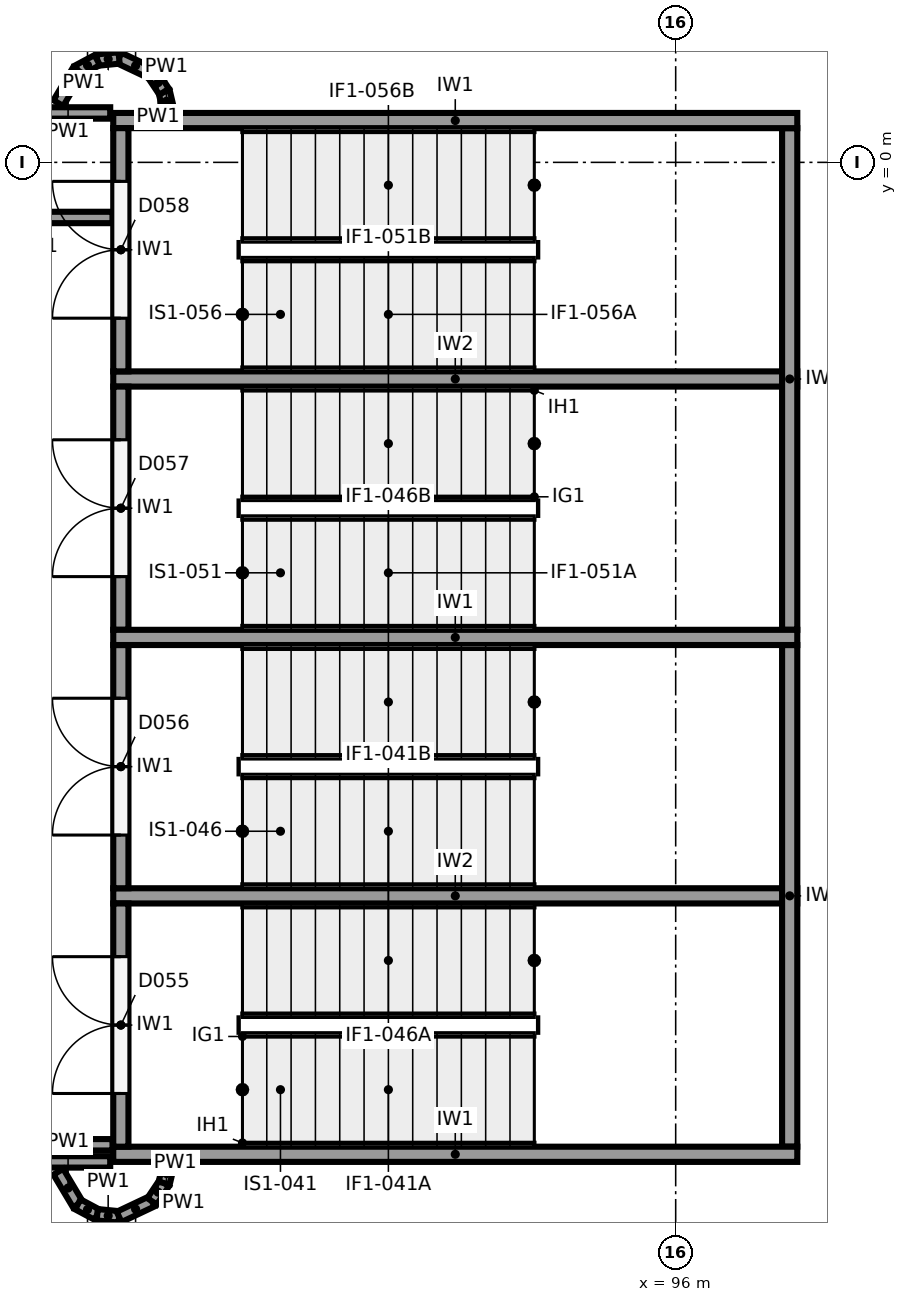
"""IFC4 building model, lengths in metres.
Left out: names, types, materials, properties, quantities, classifications, styles, units other than length and angle.
Written with IfcOpenShell. Run it as: python <this file> out.ifc"""

import sys

from ifc_helpers import new_model, si_unit, direction, frame, frame_2d, origin, place, context, subcontext, project, spatial, rectangle, extrude, element, fill, save


model = new_model("IFC4")
c1 = context("Model", 3, precision=1e-05, world=origin(), true_north=direction((0.0, 1.0)))
c2 = subcontext(c1, "Body", "Model", "MODEL_VIEW")
j1 = project(units=[si_unit("LENGTHUNIT", "METRE"), si_unit("PLANEANGLEUNIT", "RADIAN")], contexts=[c1])
p1 = place(None, origin())
s1 = spatial("IfcSite", under=j1, at=p1, CompositionType="ELEMENT")
p2 = place(p1, origin())
s2 = spatial("IfcBuilding", under=s1, at=p2, CompositionType="ELEMENT")
p3 = place(p2, frame((0.0, 0.0, -4.0)))
s3 = spatial("IfcBuildingStorey", under=s2, at=p3, CompositionType="ELEMENT", Elevation=-4.0)
for number, where, z_axis, x_axis in (
    (1, (97.6, -13.05, -1.2), (0.0, 0.0, 1.0), (-1.0, 0.0, 0.0)),
    (2, (97.6, -6.25, -1.2), (0.0, 0.0, 1.0), (-1.0, 0.0, 0.0)),
    (3, (97.6, 0.55, -1.2), (0.0, 0.0, 1.0), (-1.0, 0.0, 0.0)),
):
    element("IfcWall", number, at=place(p3, frame(where, z_axis=z_axis, x_axis=x_axis)), inside=s3, PredefinedType="SHEAR", context=c2, shape_type="SweptSolid", body=[
        extrude(rectangle(XDim=9.0, YDim=0.2, at=frame_2d((4.5, 0.0))), origin(), (0.0, 0.0, 1.0), 4.8),
    ])
for number, where, z_axis, x_axis in (
    (4, (97.5, -12.95, -1.2), (0.0, 0.0, 1.0), (0.0, 1.0, 0.0)),
    (5, (97.5, -6.15, -1.2), (0.0, 0.0, 1.0), (0.0, 1.0, 0.0)),
):
    element("IfcWall", number, at=place(p3, frame(where, z_axis=z_axis, x_axis=x_axis)), inside=s3, PredefinedType="SHEAR", context=c2, shape_type="SweptSolid", body=[
        extrude(rectangle(XDim=6.6, YDim=0.2, at=frame_2d((3.3, 0.0))), origin(), (0.0, 0.0, 1.0), 4.8),
    ])
for number, where, z_axis, x_axis in (
    (6, (97.6, -9.65, -1.2), (0.0, 0.0, 1.0), (-1.0, 0.0, 0.0)),
    (7, (97.6, -2.85, -1.2), (0.0, 0.0, 1.0), (-1.0, 0.0, 0.0)),
):
    element("IfcWall", number, at=place(p3, frame(where, z_axis=z_axis, x_axis=x_axis)), inside=s3, PredefinedType="SHEAR", context=c2, shape_type="SweptSolid", body=[
        extrude(rectangle(XDim=9.0, YDim=0.2, at=frame_2d((4.5, 0.0))), origin(), (0.0, 0.0, 1.0), 4.8),
    ])
p4 = place(p3, frame((88.7, -12.95, -1.2), z_axis=(0.0, 0.0, 1.0), x_axis=(0.0, 1.0, 0.0)))
e8 = element("IfcWall", 8, at=p4, inside=s3, PredefinedType="SHEAR", context=c2, shape_type="SweptSolid", body=[
    extrude(rectangle(XDim=3.2, YDim=0.2, at=frame_2d((1.6, 0.0))), origin(), (0.0, 0.0, 1.0), 4.8),
])
p5 = place(p4, frame((0.7, 0.0, 1.2)))
e9 = element("IfcOpeningElement", 9, at=p5, cuts=e8, PredefinedType="OPENING", context=c2, shape_type="SweptSolid", body=[
    extrude(rectangle(XDim=1.8, YDim=2.1, at=frame_2d((0.9, 1.05))), frame((0.0, 0.11, 0.0), z_axis=(0.0, -1.0, 0.0), x_axis=(1.0, 0.0, 0.0)), (0.0, 0.0, 1.0), 0.22),
])
p6 = place(p3, frame((88.7, -9.55, -1.2), z_axis=(0.0, 0.0, 1.0), x_axis=(0.0, 1.0, 0.0)))
e10 = element("IfcWall", 10, at=p6, inside=s3, PredefinedType="SHEAR", context=c2, shape_type="SweptSolid", body=[
    extrude(rectangle(XDim=3.2, YDim=0.2, at=frame_2d((1.6, 0.0))), origin(), (0.0, 0.0, 1.0), 4.8),
])
p7 = place(p6, frame((0.7, 0.0, 1.2)))
e11 = element("IfcOpeningElement", 11, at=p7, cuts=e10, PredefinedType="OPENING", context=c2, shape_type="SweptSolid", body=[
    extrude(rectangle(XDim=1.8, YDim=2.1, at=frame_2d((0.9, 1.05))), frame((0.0, 0.11, 0.0), z_axis=(0.0, -1.0, 0.0), x_axis=(1.0, 0.0, 0.0)), (0.0, 0.0, 1.0), 0.22),
])
p8 = place(p3, frame((88.7, -6.15, -1.2), z_axis=(0.0, 0.0, 1.0), x_axis=(0.0, 1.0, 0.0)))
e12 = element("IfcWall", 12, at=p8, inside=s3, PredefinedType="SHEAR", context=c2, shape_type="SweptSolid", body=[
    extrude(rectangle(XDim=3.2, YDim=0.2, at=frame_2d((1.6, 0.0))), origin(), (0.0, 0.0, 1.0), 4.8),
])
p9 = place(p8, frame((0.7, 0.0, 1.2)))
e13 = element("IfcOpeningElement", 13, at=p9, cuts=e12, PredefinedType="OPENING", context=c2, shape_type="SweptSolid", body=[
    extrude(rectangle(XDim=1.8, YDim=2.1, at=frame_2d((0.9, 1.05))), frame((0.0, 0.11, 0.0), z_axis=(0.0, -1.0, 0.0), x_axis=(1.0, 0.0, 0.0)), (0.0, 0.0, 1.0), 0.22),
])
p10 = place(p3, frame((88.7, -2.75, -1.2), z_axis=(0.0, 0.0, 1.0), x_axis=(0.0, 1.0, 0.0)))
e14 = element("IfcWall", 14, at=p10, inside=s3, PredefinedType="SHEAR", context=c2, shape_type="SweptSolid", body=[
    extrude(rectangle(XDim=3.2, YDim=0.2, at=frame_2d((1.6, 0.0))), origin(), (0.0, 0.0, 1.0), 4.8),
])
p11 = place(p10, frame((0.7, 0.0, 1.2)))
e15 = element("IfcOpeningElement", 15, at=p11, cuts=e14, PredefinedType="OPENING", context=c2, shape_type="SweptSolid", body=[
    extrude(rectangle(XDim=1.8, YDim=2.1, at=frame_2d((0.9, 1.05))), frame((0.0, 0.11, 0.0), z_axis=(0.0, -1.0, 0.0), x_axis=(1.0, 0.0, 0.0)), (0.0, 0.0, 1.0), 0.22),
])
p12 = place(p3, frame((85.577, -13.15, 0.0), z_axis=(0.0, 0.0, 1.0), x_axis=(1.0, 0.0, 0.0)))
e16 = element("IfcWall", 16, at=p12, inside=s3, PredefinedType="PARTITIONING", context=c2, shape_type="SweptSolid", body=[
    extrude(rectangle(XDim=2.983, YDim=0.15, at=frame_2d((1.491, 0.0))), origin(), (0.0, 0.0, 1.0), 3.6),
])
p13 = place(p3, frame((88.56, 0.65, 0.0), z_axis=(0.0, 0.0, 1.0), x_axis=(-1.0, 0.0, 0.0)))
e17 = element("IfcWall", 17, at=p13, inside=s3, PredefinedType="PARTITIONING", context=c2, shape_type="SweptSolid", body=[
    extrude(rectangle(XDim=2.983, YDim=0.15, at=frame_2d((1.491, 0.0))), origin(), (0.0, 0.0, 1.0), 3.6),
])
p14 = place(p13, frame((0.95, 0.0, 0.0)))
e18 = element("IfcOpeningElement", 18, at=p14, cuts=e17, PredefinedType="OPENING", context=c2, shape_type="SweptSolid", body=[
    extrude(rectangle(XDim=1.0, YDim=2.1, at=frame_2d((0.5, 1.05))), frame((0.0, 0.085, 0.0), z_axis=(0.0, -1.0, 0.0), x_axis=(1.0, 0.0, 0.0)), (0.0, 0.0, 1.0), 0.17),
])
p15 = place(p3, frame((86.16, -12.925, 0.0), z_axis=(0.0, 0.0, 1.0), x_axis=(1.0, 0.0, 0.0)))
e19 = element("IfcWall", 19, at=p15, inside=s3, PredefinedType="PARTITIONING", context=c2, shape_type="SweptSolid", body=[
    extrude(rectangle(XDim=2.43, YDim=0.15, at=frame_2d((1.215, 0.0))), origin(), (0.0, 0.0, 1.0), 3.6),
])
p16 = place(p3, frame((88.59, -0.725, 0.0), z_axis=(0.0, 0.0, 1.0), x_axis=(-1.0, 0.0, 0.0)))
e20 = element("IfcWall", 20, at=p16, inside=s3, PredefinedType="PARTITIONING", context=c2, shape_type="SweptSolid", body=[
    extrude(rectangle(XDim=2.465, YDim=0.15, at=frame_2d((1.232, 0.0))), origin(), (0.0, 0.0, 1.0), 3.6),
])
p17 = place(p3, frame((87.877, -13.279, 0.0), z_axis=(0.0, 0.0, 1.0), x_axis=(0.513060623194, -0.858352373404, 0.0)))
e21 = element("IfcWall", 21, at=p17, inside=s3, PredefinedType="PARTITIONING", context=c2, shape_type="SweptSolid", body=[
    extrude(rectangle(XDim=0.5, YDim=0.15, at=frame_2d((0.25, 0.0))), origin(), (0.0, 0.0, 1.0), 3.6),
])
for number, where, z_axis, x_axis in (
    (22, (88.134, -13.709, 0.0), (0.0, 0.0, 1.0), (0.882, -0.472, 0.0)),
    (23, (88.389, -13.845, 0.0), (0.0, 0.0, 1.0), (0.995, -0.098, 0.0)),
):
    element("IfcWall", number, at=place(p3, frame(where, z_axis=z_axis, x_axis=x_axis)), inside=s3, PredefinedType="PARTITIONING", context=c2, shape_type="SweptSolid", body=[
        extrude(rectangle(XDim=0.289, YDim=0.15, at=frame_2d((0.145, 0.0))), origin(), (0.0, 0.0, 1.0), 3.6),
    ])
p18 = place(p3, frame((88.677, -13.874, 0.0), z_axis=(0.0, 0.0, 1.0), x_axis=(0.90398642908, 0.427561148889, 0.0)))
e24 = element("IfcWall", 24, at=p18, inside=s3, PredefinedType="PARTITIONING", context=c2, shape_type="SweptSolid", body=[
    extrude(rectangle(XDim=0.48, YDim=0.15, at=frame_2d((0.24, 0.0))), origin(), (0.0, 0.0, 1.0), 3.6),
])
p19 = place(p3, frame((89.111, -13.668, 0.0), z_axis=(0.0, 0.0, 1.0), x_axis=(0.555678694372, 0.831397130511, 0.0)))
e25 = element("IfcWall", 25, at=p19, inside=s3, PredefinedType="PARTITIONING", context=c2, shape_type="SweptSolid", body=[
    extrude(rectangle(XDim=0.288, YDim=0.15, at=frame_2d((0.144, 0.0))), origin(), (0.0, 0.0, 1.0), 3.6),
])
for number, where, z_axis, x_axis in (
    (26, (89.271, -13.429, 0.0), (0.0, 0.0, 1.0), (0.23, 0.973, 0.0)),
    (27, (89.33, 0.678, 0.0), (0.0, 0.0, 1.0), (-0.23, 0.973, 0.0)),
):
    element("IfcWall", number, at=place(p3, frame(where, z_axis=z_axis, x_axis=x_axis)), inside=s3, PredefinedType="PARTITIONING", context=c2, shape_type="SweptSolid", body=[
        extrude(rectangle(XDim=0.258, YDim=0.15, at=frame_2d((0.129, 0.0))), origin(), (0.0, 0.0, 1.0), 3.6),
    ])
p20 = place(p3, frame((89.271, 0.929, 0.0), z_axis=(0.0, 0.0, 1.0), x_axis=(-0.555678694372, 0.831397130511, 0.0)))
e28 = element("IfcWall", 28, at=p20, inside=s3, PredefinedType="PARTITIONING", context=c2, shape_type="SweptSolid", body=[
    extrude(rectangle(XDim=0.288, YDim=0.15, at=frame_2d((0.144, 0.0))), origin(), (0.0, 0.0, 1.0), 3.6),
])
p21 = place(p3, frame((89.111, 1.168, 0.0), z_axis=(0.0, 0.0, 1.0), x_axis=(-0.90398642908, 0.427561148889, 0.0)))
e29 = element("IfcWall", 29, at=p21, inside=s3, PredefinedType="PARTITIONING", context=c2, shape_type="SweptSolid", body=[
    extrude(rectangle(XDim=0.48, YDim=0.15, at=frame_2d((0.24, 0.0))), origin(), (0.0, 0.0, 1.0), 3.6),
])
for number, where, z_axis, x_axis in (
    (30, (88.677, 1.374, 0.0), (0.0, 0.0, 1.0), (-0.995, -0.098, 0.0)),
    (31, (88.389, 1.345, 0.0), (0.0, 0.0, 1.0), (-0.882, -0.472, 0.0)),
):
    element("IfcWall", number, at=place(p3, frame(where, z_axis=z_axis, x_axis=x_axis)), inside=s3, PredefinedType="PARTITIONING", context=c2, shape_type="SweptSolid", body=[
        extrude(rectangle(XDim=0.289, YDim=0.15, at=frame_2d((0.145, 0.0))), origin(), (0.0, 0.0, 1.0), 3.6),
    ])
p22 = place(p3, frame((88.134, 1.209, 0.0), z_axis=(0.0, 0.0, 1.0), x_axis=(-0.513060623194, -0.858352373404, 0.0)))
e32 = element("IfcWall", 32, at=p22, inside=s3, PredefinedType="PARTITIONING", context=c2, shape_type="SweptSolid", body=[
    extrude(rectangle(XDim=0.5, YDim=0.15, at=frame_2d((0.25, 0.0))), origin(), (0.0, 0.0, 1.0), 3.6),
])
p23 = place(p5, origin())
e33 = element("IfcDoor", 33, at=p23, inside=s3, OperationType="DOUBLE_DOOR_SINGLE_SWING", PredefinedType="DOOR", context=c2, shape_type="SweptSolid", body=[
    extrude(rectangle(XDim=1.8, YDim=2.1, at=frame_2d((0.9, 1.05))), frame((0.0, 0.025, 0.0), z_axis=(0.0, -1.0, 0.0), x_axis=(1.0, 0.0, 0.0)), (0.0, 0.0, 1.0), 0.05),
])
fill(e9, e33)
p24 = place(p7, origin())
e34 = element("IfcDoor", 34, at=p24, inside=s3, OperationType="DOUBLE_DOOR_SINGLE_SWING", PredefinedType="DOOR", context=c2, shape_type="SweptSolid", body=[
    extrude(rectangle(XDim=1.8, YDim=2.1, at=frame_2d((0.9, 1.05))), frame((0.0, 0.025, 0.0), z_axis=(0.0, -1.0, 0.0), x_axis=(1.0, 0.0, 0.0)), (0.0, 0.0, 1.0), 0.05),
])
fill(e11, e34)
p25 = place(p9, origin())
e35 = element("IfcDoor", 35, at=p25, inside=s3, OperationType="DOUBLE_DOOR_SINGLE_SWING", PredefinedType="DOOR", context=c2, shape_type="SweptSolid", body=[
    extrude(rectangle(XDim=1.8, YDim=2.1, at=frame_2d((0.9, 1.05))), frame((0.0, 0.025, 0.0), z_axis=(0.0, -1.0, 0.0), x_axis=(1.0, 0.0, 0.0)), (0.0, 0.0, 1.0), 0.05),
])
fill(e13, e35)
p26 = place(p11, origin())
e36 = element("IfcDoor", 36, at=p26, inside=s3, OperationType="DOUBLE_DOOR_SINGLE_SWING", PredefinedType="DOOR", context=c2, shape_type="SweptSolid", body=[
    extrude(rectangle(XDim=1.8, YDim=2.1, at=frame_2d((0.9, 1.05))), frame((0.0, 0.025, 0.0), z_axis=(0.0, -1.0, 0.0), x_axis=(1.0, 0.0, 0.0)), (0.0, 0.0, 1.0), 0.05),
])
fill(e15, e36)
save(model, sys.argv[1])
